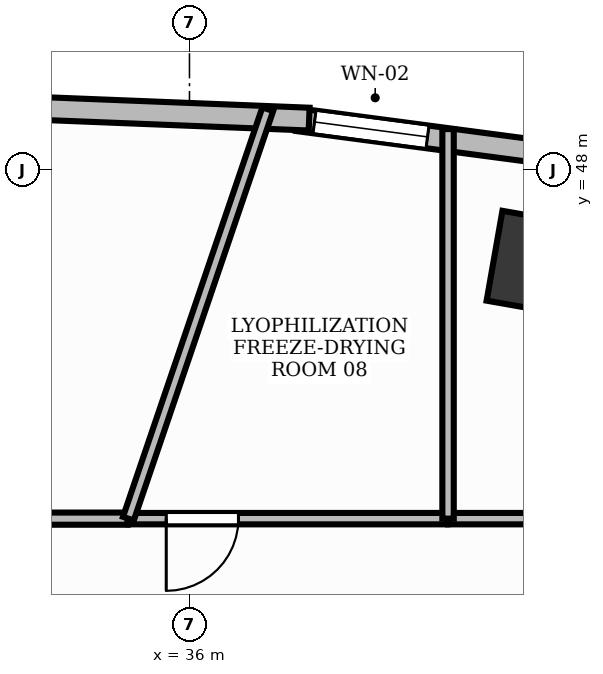
"""IFC4 building model, lengths in metres.
Left out: names, types, materials, properties, quantities, classifications, styles, units other than length and angle.
Written with IfcOpenShell. Run it as: python <this file> out.ifc"""

import sys

from ifc_helpers import new_model, si_unit, direction, frame, frame_2d, origin, origin_2d, place, context, subcontext, project, spatial, rectangle, extrude, element, fill, save


model = new_model("IFC4")
c1 = context("Model", 3, precision=1e-05, world=origin(), true_north=direction((0.0, 1.0)))
c2 = subcontext(c1, "Body", "Model", "MODEL_VIEW")
j1 = project(units=[si_unit("LENGTHUNIT", "METRE"), si_unit("PLANEANGLEUNIT", "RADIAN")], contexts=[c1])
p1 = place(None, origin())
s1 = spatial("IfcSite", under=j1, at=p1, CompositionType="ELEMENT")
p2 = place(p1, origin())
s2 = spatial("IfcBuilding", under=s1, at=p2, CompositionType="ELEMENT")
p3 = place(p2, frame((0.0, 0.0, 90.0)))
s3 = spatial("IfcBuildingStorey", under=s2, at=p3, CompositionType="ELEMENT", Elevation=90.0)
p4 = place(p3, frame((40.604, 46.765, -0.0), z_axis=(0.0, 0.0, 1.0), x_axis=(-0.984868307662, 0.173304404339, 0.0)))
e1 = element("IfcColumn", 1, at=p4, inside=s3, PredefinedType="COLUMN", context=c2, shape_type="SweptSolid", body=[
    extrude(rectangle(XDim=1.2, YDim=1.2, at=origin_2d()), origin(), (0.0, 0.0, 1.0), 3.901),
])
p5 = place(p3, frame((40.964, 48.19, 0.0), z_axis=(0.0, 0.0, 1.0), x_axis=(-0.991369257822, 0.131099178664, 0.0)))
e2 = element("IfcWall", 2, at=p5, inside=s3, PredefinedType="STANDARD", context=c2, shape_type="SweptSolid", body=[
    extrude(rectangle(XDim=3.575, YDim=0.3, at=frame_2d((1.788, 0.0))), origin(), (0.0, 0.0, 1.0), 3.47),
])
p6 = place(p5, frame((1.848, 0.0, 0.95)))
e3 = element("IfcOpeningElement", 3, at=p6, cuts=e2, PredefinedType="OPENING", context=c2, shape_type="SweptSolid", body=[
    extrude(rectangle(XDim=1.5, YDim=1.8, at=frame_2d((0.75, 0.9))), frame((0.0, 0.165, 0.0), z_axis=(0.0, -1.0, 0.0), x_axis=(1.0, 0.0, 0.0)), (0.0, 0.0, 1.0), 0.33),
])
p7 = place(p3, frame((37.574, 48.666, 0.0), z_axis=(0.0, 0.0, 1.0), x_axis=(-0.999212076676, 0.039689114679, 0.0)))
e4 = element("IfcWall", 4, at=p7, inside=s3, PredefinedType="STANDARD", context=c2, shape_type="SweptSolid", body=[
    extrude(rectangle(XDim=3.635, YDim=0.3, at=frame_2d((1.818, 0.0))), origin(), (0.0, 0.0, 1.0), 3.9),
])
p8 = place(p3, frame((44.2, 43.41, 0.0), z_axis=(0.0, 0.0, 1.0), x_axis=(-1.0, 0.0, 0.0)))
e5 = element("IfcWall", 5, at=p8, inside=s3, PredefinedType="PARTITIONING", context=c2, shape_type="SweptSolid", body=[
    extrude(rectangle(XDim=4.798, YDim=0.15, at=frame_2d((2.399, 0.0))), origin(), (0.0, 0.0, 1.0), 2.91),
])
p9 = place(p8, frame((0.24, 0.0, 0.0)))
e6 = element("IfcOpeningElement", 6, at=p9, cuts=e5, PredefinedType="OPENING", context=c2, shape_type="SweptSolid", body=[
    extrude(rectangle(XDim=0.95, YDim=2.15, at=frame_2d((0.475, 1.075))), frame((0.0, 0.09, 0.0), z_axis=(0.0, -1.0, 0.0), x_axis=(1.0, 0.0, 0.0)), (0.0, 0.0, 1.0), 0.18),
])
p10 = place(p3, frame((39.392, 43.41, 0.0), z_axis=(0.0, 0.0, 1.0), x_axis=(-1.0, 0.0, 0.0)))
e7 = element("IfcWall", 7, at=p10, inside=s3, PredefinedType="PARTITIONING", context=c2, shape_type="SweptSolid", body=[
    extrude(rectangle(XDim=4.196, YDim=0.15, at=frame_2d((2.098, 0.0))), origin(), (0.0, 0.0, 1.0), 2.91),
])
p11 = place(p10, frame((2.748, 0.0, 0.0)))
e8 = element("IfcOpeningElement", 8, at=p11, cuts=e7, PredefinedType="OPENING", context=c2, shape_type="SweptSolid", body=[
    extrude(rectangle(XDim=0.95, YDim=2.15, at=frame_2d((0.475, 1.075))), frame((0.0, 0.09, 0.0), z_axis=(0.0, -1.0, 0.0), x_axis=(1.0, 0.0, 0.0)), (0.0, 0.0, 1.0), 0.18),
])
p12 = place(p3, frame((35.186, 43.41, 0.0), z_axis=(0.0, 0.0, 1.0), x_axis=(-1.0, 0.0, 0.0)))
e9 = element("IfcWall", 9, at=p12, inside=s3, PredefinedType="PARTITIONING", context=c2, shape_type="SweptSolid", body=[
    extrude(rectangle(XDim=15.144, YDim=0.16, at=frame_2d((7.572, 0.0))), origin(), (0.0, 0.0, 1.0), 2.91),
])
p13 = place(p12, frame((7.387, 0.0, 0.0)))
e10 = element("IfcOpeningElement", 10, at=p13, cuts=e9, PredefinedType="OPENING", context=c2, shape_type="SweptSolid", body=[
    extrude(rectangle(XDim=0.95, YDim=2.15, at=frame_2d((0.475, 1.075))), frame((0.0, 0.095, 0.0), z_axis=(0.0, -1.0, 0.0), x_axis=(1.0, 0.0, 0.0)), (0.0, 0.0, 1.0), 0.19),
])
p14 = place(p3, frame((39.402, 43.41, 0.0), z_axis=(0.0, 0.0, 1.0), x_axis=(0.0, 1.0, 0.0)))
e11 = element("IfcWall", 11, at=p14, inside=s3, PredefinedType="PARTITIONING", context=c2, shape_type="SweptSolid", body=[
    extrude(rectangle(XDim=5.125, YDim=0.15, at=frame_2d((2.563, 0.0))), origin(), (0.0, 0.0, 1.0), 2.91),
])
p15 = place(p3, frame((35.196, 43.41, 0.0), z_axis=(0.0, 0.0, 1.0), x_axis=(0.322244983046, 0.946656310866, 0.0)))
e12 = element("IfcWall", 12, at=p15, inside=s3, PredefinedType="PARTITIONING", context=c2, shape_type="SweptSolid", body=[
    extrude(rectangle(XDim=5.69, YDim=0.15, at=frame_2d((2.845, 0.0))), origin(), (0.0, 0.0, 1.0), 2.91),
])
p16 = place(p6, origin())
e13 = element("IfcWindow", 13, at=p16, inside=s3, PartitioningType="DOUBLE_PANEL_VERTICAL", PredefinedType="WINDOW", context=c2, shape_type="SweptSolid", body=[
    extrude(rectangle(XDim=1.5, YDim=1.8, at=frame_2d((0.75, 0.9))), frame((0.0, 0.03, 0.0), z_axis=(0.0, -1.0, 0.0), x_axis=(1.0, 0.0, 0.0)), (0.0, 0.0, 1.0), 0.06),
])
fill(e3, e13)
p17 = place(p11, origin())
e14 = element("IfcDoor", 14, at=p17, inside=s3, OperationType="SINGLE_SWING_RIGHT", PredefinedType="DOOR", context=c2, shape_type="SweptSolid", body=[
    extrude(rectangle(XDim=0.95, YDim=2.15, at=frame_2d((0.475, 1.075))), frame((0.0, 0.025, 0.0), z_axis=(0.0, -1.0, 0.0), x_axis=(1.0, 0.0, 0.0)), (0.0, 0.0, 1.0), 0.05),
])
fill(e8, e14)
save(model, sys.argv[1])
